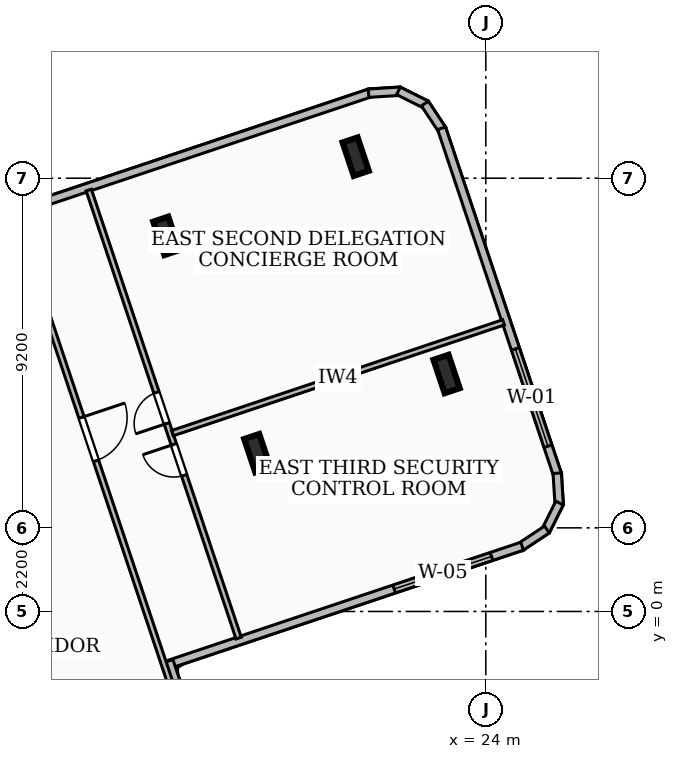
"""IFC4 building model, lengths in metres.
Left out: names, types, materials, properties, quantities, classifications, styles, units other than length and angle.
Written with IfcOpenShell. Run it as: python <this file> out.ifc"""

import sys

from ifc_helpers import new_model, si_unit, direction, frame, frame_2d, origin, origin_2d, place, context, subcontext, project, spatial, rectangle, i_section, extrude, element, fill, save


model = new_model("IFC4")
c1 = context("Model", 3, precision=1e-05, world=origin(), true_north=direction((0.0, 1.0)))
c2 = subcontext(c1, "Body", "Model", "MODEL_VIEW")
j1 = project(units=[si_unit("LENGTHUNIT", "METRE"), si_unit("PLANEANGLEUNIT", "RADIAN")], contexts=[c1])
p1 = place(None, origin())
s1 = spatial("IfcSite", under=j1, at=p1, CompositionType="ELEMENT")
p2 = place(p1, origin())
s2 = spatial("IfcBuilding", under=s1, at=p2, CompositionType="ELEMENT")
p3 = place(p2, frame((0.0, 0.0, 163.08)))
s3 = spatial("IfcBuildingStorey", under=s2, at=p3, CompositionType="ELEMENT", Elevation=163.08)
for number, where, z_axis, x_axis in (
    (1, (17.987, 4.164, 0.0), (0.0, 0.0, 1.0), (0.948, 0.317, 0.0)),
    (2, (15.594, 9.883, 0.0), (0.0, 0.0, 1.0), (0.948, 0.317, 0.0)),
    (3, (22.968, 6.248, 0.0), (0.0, 0.0, 1.0), (0.948, 0.317, 0.0)),
    (4, (20.576, 11.967, 0.0), (0.0, 0.0, 1.0), (0.948, 0.317, 0.0)),
):
    element("IfcColumn", number, at=place(p3, frame(where, z_axis=z_axis, x_axis=x_axis)), inside=s3, PredefinedType="COLUMN", context=c2, shape_type="SweptSolid", body=[
        extrude(i_section(OverallWidth=0.418, OverallDepth=0.927, WebThickness=0.019, FlangeThickness=0.032, at=origin_2d()), origin(), (0.0, 0.0, 1.0), 3.6),
    ])
p4 = place(p3, frame((11.615, 10.519, 0.0), z_axis=(0.0, 0.0, 1.0), x_axis=(0.948331055834, 0.317282537404, 0.0)))
e5 = element("IfcWall", 5, at=p4, inside=s3, PredefinedType="SOLIDWALL", context=c2, shape_type="SweptSolid", body=[
    extrude(rectangle(XDim=9.858, YDim=0.22, at=frame_2d((4.929, 0.0))), origin(), (0.0, 0.0, 1.0), 2.644),
])
p5 = place(p3, frame((20.915, 13.637, 0.0), z_axis=(0.0, 0.0, 1.0), x_axis=(0.998057128569, 0.062305442082, 0.0)))
e6 = element("IfcWall", 6, at=p5, inside=s3, PredefinedType="SOLIDWALL", context=c2, shape_type="SweptSolid", body=[
    extrude(rectangle(XDim=0.835, YDim=0.22, at=frame_2d((0.417, 0.0))), origin(), (0.0, 0.0, 1.0), 3.34),
])
p6 = place(p3, frame((21.701, 13.698, 0.0), z_axis=(0.0, 0.0, 1.0), x_axis=(0.894963703084, -0.446138958356, 0.0)))
e7 = element("IfcWall", 7, at=p6, inside=s3, PredefinedType="SOLIDWALL", context=c2, shape_type="SweptSolid", body=[
    extrude(rectangle(XDim=0.818, YDim=0.22, at=frame_2d((0.409, 0.0))), origin(), (0.0, 0.0, 1.0), 3.34),
])
p7 = place(p3, frame((22.397, 13.365, 0.0), z_axis=(0.0, 0.0, 1.0), x_axis=(0.552133058206, -0.833756011094, 0.0)))
e8 = element("IfcWall", 8, at=p7, inside=s3, PredefinedType="SOLIDWALL", context=c2, shape_type="SweptSolid", body=[
    extrude(rectangle(XDim=0.835, YDim=0.22, at=frame_2d((0.417, 0.0))), origin(), (0.0, 0.0, 1.0), 3.34),
])
p8 = place(p3, frame((22.836, 12.714, 0.0), z_axis=(0.0, 0.0, 1.0), x_axis=(0.317285610931, -0.94833002752, 0.0)))
e9 = element("IfcWall", 9, at=p8, inside=s3, PredefinedType="SOLIDWALL", context=c2, shape_type="SweptSolid", body=[
    extrude(rectangle(XDim=9.622, YDim=0.22, at=frame_2d((4.811, 0.0))), origin(), (0.0, 0.0, 1.0), 3.34),
])
p9 = place(p8, frame((6.122, 0.0, 0.85)))
e10 = element("IfcOpeningElement", 10, at=p9, cuts=e9, PredefinedType="OPENING", context=c2, shape_type="SweptSolid", body=[
    extrude(rectangle(XDim=2.7, YDim=2.1, at=frame_2d((1.35, 1.05))), frame((0.0, 0.12, 0.0), z_axis=(0.0, -1.0, 0.0), x_axis=(1.0, 0.0, 0.0)), (0.0, 0.0, 1.0), 0.24),
])
p10 = place(p3, frame((25.879, 3.638, 0.0), z_axis=(0.0, 0.0, 1.0), x_axis=(0.062378286155, -0.998052578483, 0.0)))
e11 = element("IfcWall", 11, at=p10, inside=s3, PredefinedType="SOLIDWALL", context=c2, shape_type="SweptSolid", body=[
    extrude(rectangle(XDim=0.834, YDim=0.22, at=frame_2d((0.417, 0.0))), origin(), (0.0, 0.0, 1.0), 3.34),
])
p11 = place(p3, frame((25.94, 2.853, 0.0), z_axis=(0.0, 0.0, 1.0), x_axis=(-0.445781750405, -0.895141682085, 0.0)))
e12 = element("IfcWall", 12, at=p11, inside=s3, PredefinedType="SOLIDWALL", context=c2, shape_type="SweptSolid", body=[
    extrude(rectangle(XDim=0.819, YDim=0.22, at=frame_2d((0.409, 0.0))), origin(), (0.0, 0.0, 1.0), 3.34),
])
p12 = place(p3, frame((25.607, 2.156, 0.0), z_axis=(0.0, 0.0, 1.0), x_axis=(-0.833756011094, -0.552133058206, 0.0)))
e13 = element("IfcWall", 13, at=p12, inside=s3, PredefinedType="SOLIDWALL", context=c2, shape_type="SweptSolid", body=[
    extrude(rectangle(XDim=0.835, YDim=0.22, at=frame_2d((0.417, 0.0))), origin(), (0.0, 0.0, 1.0), 3.34),
])
p13 = place(p3, frame((24.956, 1.717, 0.0), z_axis=(0.0, 0.0, 1.0), x_axis=(-0.948331055834, -0.317282537404, 0.0)))
e14 = element("IfcWall", 14, at=p13, inside=s3, PredefinedType="SOLIDWALL", context=c2, shape_type="SweptSolid", body=[
    extrude(rectangle(XDim=9.858, YDim=0.22, at=frame_2d((4.929, 0.0))), origin(), (0.0, 0.0, 1.0), 3.34),
])
p14 = place(p13, frame((0.85, 0.0, 0.85)))
e15 = element("IfcOpeningElement", 15, at=p14, cuts=e14, PredefinedType="OPENING", context=c2, shape_type="SweptSolid", body=[
    extrude(rectangle(XDim=2.7, YDim=1.85, at=frame_2d((1.35, 0.925))), frame((0.0, 0.12, 0.0), z_axis=(0.0, -1.0, 0.0), x_axis=(1.0, 0.0, 0.0)), (0.0, 0.0, 1.0), 0.24),
])
p15 = place(p3, frame((15.662, -1.3, 0.0), z_axis=(0.0, 0.0, 1.0), x_axis=(0.317224676093, -0.948350412494, 0.0)))
e16 = element("IfcWall", 16, at=p15, inside=s3, PredefinedType="SOLIDWALL", context=c2, shape_type="SweptSolid", body=[
    extrude(rectangle(XDim=6.758, YDim=0.22, at=frame_2d((3.379, 0.0))), origin(), (0.0, 0.0, 1.0), 3.34),
])
p16 = place(p3, frame((10.372, 14.037, 0.0), z_axis=(0.0, 0.0, 1.0), x_axis=(0.317298382655, -0.94832575435, 0.0)))
e17 = element("IfcWall", 17, at=p16, inside=s3, PredefinedType="PARTITIONING", context=c2, shape_type="SweptSolid", body=[
    extrude(rectangle(XDim=20.041, YDim=0.145, at=frame_2d((10.021, 0.0))), origin(), (0.0, 0.0, 1.0), 2.644),
])
p17 = place(p16, frame((9.42, 0.0, 0.0)))
e18 = element("IfcOpeningElement", 18, at=p17, cuts=e17, PredefinedType="OPENING", context=c2, shape_type="SweptSolid", body=[
    extrude(rectangle(XDim=1.2, YDim=2.1, at=frame_2d((0.6, 1.05))), frame((0.0, 0.083, 0.0), z_axis=(0.0, -1.0, 0.0), x_axis=(1.0, 0.0, 0.0)), (0.0, 0.0, 1.0), 0.165),
])
p18 = place(p3, frame((15.755, 4.692, 0.0), z_axis=(0.0, 0.0, 1.0), x_axis=(0.94831322287, 0.317335833667, 0.0)))
e19 = element("IfcWall", 19, at=p18, inside=s3, PredefinedType="PARTITIONING", context=c2, shape_type="SweptSolid", body=[
    extrude(rectangle(XDim=9.186, YDim=0.145, at=frame_2d((4.593, 0.0))), origin(), (0.0, 0.0, 1.0), 2.793),
])
p19 = place(p3, frame((17.496, -0.7, 0.0), z_axis=(0.0, 0.0, 1.0), x_axis=(-0.317299961245, 0.948325226172, 0.0)))
e20 = element("IfcWall", 20, at=p19, inside=s3, PredefinedType="PARTITIONING", context=c2, shape_type="SweptSolid", body=[
    extrude(rectangle(XDim=12.43, YDim=0.145, at=frame_2d((6.215, 0.0))), origin(), (0.0, 0.0, 1.0), 2.644),
])
p20 = place(p19, frame((4.515, 0.0, 0.0)))
e21 = element("IfcOpeningElement", 21, at=p20, cuts=e20, PredefinedType="OPENING", context=c2, shape_type="SweptSolid", body=[
    extrude(rectangle(XDim=0.86, YDim=2.04, at=frame_2d((0.43, 1.02))), frame((0.0, 0.083, 0.0), z_axis=(0.0, -1.0, 0.0), x_axis=(1.0, 0.0, 0.0)), (0.0, 0.0, 1.0), 0.165),
])
p21 = place(p19, frame((5.955, 0.0, 0.0)))
e22 = element("IfcOpeningElement", 22, at=p21, cuts=e20, PredefinedType="OPENING", context=c2, shape_type="SweptSolid", body=[
    extrude(rectangle(XDim=0.86, YDim=2.04, at=frame_2d((0.43, 1.02))), frame((0.0, 0.083, 0.0), z_axis=(0.0, -1.0, 0.0), x_axis=(1.0, 0.0, 0.0)), (0.0, 0.0, 1.0), 0.165),
])
p22 = place(p9, origin())
e23 = element("IfcWindow", 23, at=p22, inside=s3, PartitioningType="SINGLE_PANEL", PredefinedType="WINDOW", context=c2, shape_type="SweptSolid", body=[
    extrude(rectangle(XDim=2.7, YDim=2.1, at=frame_2d((1.35, 1.05))), frame((0.0, 0.03, 0.0), z_axis=(0.0, -1.0, 0.0), x_axis=(1.0, 0.0, 0.0)), (0.0, 0.0, 1.0), 0.06),
])
fill(e10, e23)
p23 = place(p14, origin())
e24 = element("IfcWindow", 24, at=p23, inside=s3, PartitioningType="SINGLE_PANEL", PredefinedType="WINDOW", context=c2, shape_type="SweptSolid", body=[
    extrude(rectangle(XDim=2.7, YDim=1.85, at=frame_2d((1.35, 0.925))), frame((0.0, 0.03, 0.0), z_axis=(0.0, -1.0, 0.0), x_axis=(1.0, 0.0, 0.0)), (0.0, 0.0, 1.0), 0.06),
])
fill(e15, e24)
p24 = place(p17, origin())
e25 = element("IfcDoor", 25, at=p24, inside=s3, OperationType="SINGLE_SWING_LEFT", PredefinedType="DOOR", context=c2, shape_type="SweptSolid", body=[
    extrude(rectangle(XDim=1.2, YDim=2.1, at=frame_2d((0.6, 1.05))), frame((0.0, 0.025, 0.0), z_axis=(0.0, -1.0, 0.0), x_axis=(1.0, 0.0, 0.0)), (0.0, 0.0, 1.0), 0.05),
])
fill(e18, e25)
p25 = place(p20, origin())
e26 = element("IfcDoor", 26, at=p25, inside=s3, OperationType="SINGLE_SWING_RIGHT", PredefinedType="DOOR", context=c2, shape_type="SweptSolid", body=[
    extrude(rectangle(XDim=0.86, YDim=2.04, at=frame_2d((0.43, 1.02))), frame((0.0, 0.025, 0.0), z_axis=(0.0, -1.0, 0.0), x_axis=(1.0, 0.0, 0.0)), (0.0, 0.0, 1.0), 0.05),
])
fill(e21, e26)
p26 = place(p21, origin())
e27 = element("IfcDoor", 27, at=p26, inside=s3, OperationType="SINGLE_SWING_LEFT", PredefinedType="DOOR", context=c2, shape_type="SweptSolid", body=[
    extrude(rectangle(XDim=0.86, YDim=2.04, at=frame_2d((0.43, 1.02))), frame((0.0, 0.025, 0.0), z_axis=(0.0, -1.0, 0.0), x_axis=(1.0, 0.0, 0.0)), (0.0, 0.0, 1.0), 0.05),
])
fill(e22, e27)
save(model, sys.argv[1])
